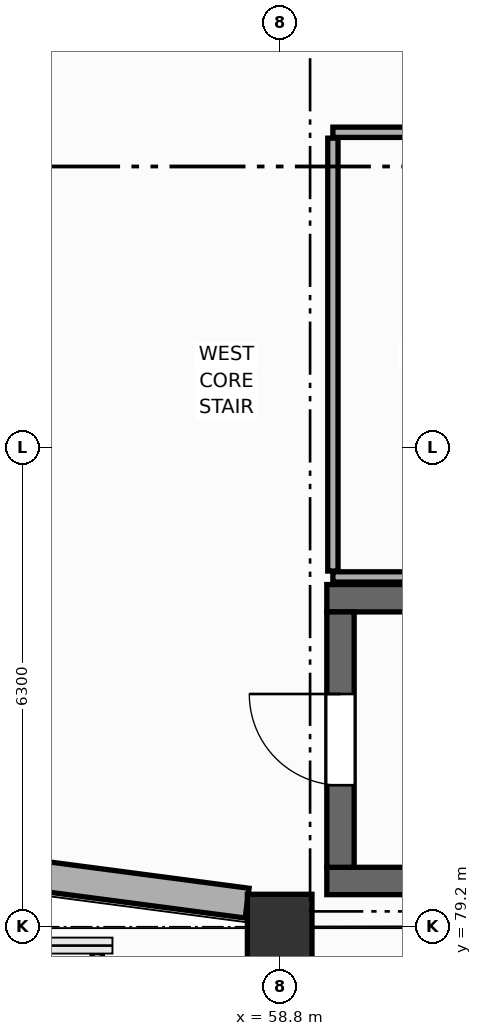
"""IFC4 building model, lengths in metres.
Left out: names, types, materials, properties, quantities, classifications, styles, units other than length and angle.
Written with IfcOpenShell. Run it as: python <this file> out.ifc"""

import sys

from ifc_helpers import new_model, si_unit, direction, frame, frame_2d, origin, origin_2d, place, context, subcontext, project, spatial, rectangle, extrude, element, fill, save


model = new_model("IFC4")
c1 = context("Model", 3, precision=1e-05, world=origin(), true_north=direction((0.0, 1.0)))
c2 = subcontext(c1, "Body", "Model", "MODEL_VIEW")
j1 = project(units=[si_unit("LENGTHUNIT", "METRE"), si_unit("PLANEANGLEUNIT", "RADIAN")], contexts=[c1])
p1 = place(None, origin())
s1 = spatial("IfcSite", under=j1, at=p1, CompositionType="ELEMENT")
p2 = place(p1, origin())
s2 = spatial("IfcBuilding", under=s1, at=p2, CompositionType="ELEMENT")
p3 = place(p2, frame((0.0, 0.0, 5.4)))
s3 = spatial("IfcBuildingStorey", under=s2, at=p3, CompositionType="ELEMENT", Elevation=5.4)
p4 = place(p3, frame((58.8, 79.2, 0.0), z_axis=(0.0, 0.0, 1.0), x_axis=(1.0, 0.0, 0.0)))
e1 = element("IfcColumn", 1, at=p4, inside=s3, PredefinedType="COLUMN", context=c2, shape_type="SweptSolid", body=[
    extrude(rectangle(XDim=0.85, YDim=0.85, at=origin_2d()), origin(), (0.0, 0.0, 1.0), 4.5),
])
p5 = place(p3, frame((55.572, 79.877, 0.0), z_axis=(0.0, 0.0, 1.0), x_axis=(0.991443994311, -0.130532778046, 0.0)))
e2 = element("IfcWall", 2, at=p5, inside=s3, PredefinedType="ELEMENTEDWALL", context=c2, shape_type="SweptSolid", body=[
    extrude(rectangle(XDim=2.824, YDim=0.395, at=frame_2d((1.412, 0.0))), origin(), (0.0, 0.0, 1.0), 3.37),
])
for number, where, z_axis, x_axis in (
    (3, (59.42, 83.52, 0.0), (0.0, 0.0, 1.0), (1.0, 0.0, 0.0)),
    (4, (68.78, 79.8, 0.0), (0.0, 0.0, 1.0), (-1.0, 0.0, 0.0)),
):
    element("IfcWall", number, at=place(p3, frame(where, z_axis=z_axis, x_axis=x_axis)), inside=s3, PredefinedType="SHEAR", context=c2, shape_type="SweptSolid", body=[
        extrude(rectangle(XDim=9.36, YDim=0.36, at=frame_2d((4.68, 0.0))), origin(), (0.0, 0.0, 1.0), 4.24),
    ])
p6 = place(p3, frame((59.6, 79.98, 0.0), z_axis=(0.0, 0.0, 1.0), x_axis=(0.0, 1.0, 0.0)))
e5 = element("IfcWall", 5, at=p6, inside=s3, PredefinedType="SHEAR", context=c2, shape_type="SweptSolid", body=[
    extrude(rectangle(XDim=3.36, YDim=0.36, at=frame_2d((1.68, 0.0))), origin(), (0.0, 0.0, 1.0), 4.24),
])
p7 = place(p6, frame((1.08, 0.0, 0.0)))
e6 = element("IfcOpeningElement", 6, at=p7, cuts=e5, PredefinedType="OPENING", context=c2, shape_type="SweptSolid", body=[
    extrude(rectangle(XDim=1.2, YDim=2.2, at=frame_2d((0.6, 1.1))), frame((0.0, 0.19, 0.0), z_axis=(0.0, -1.0, 0.0), x_axis=(1.0, 0.0, 0.0)), (0.0, 0.0, 1.0), 0.38),
])
p8 = place(p3, frame((59.5, 89.65, 0.0), z_axis=(0.0, 0.0, 1.0), x_axis=(1.0, 0.0, 0.0)))
e7 = element("IfcWall", 7, at=p8, inside=s3, PredefinedType="PARTITIONING", context=c2, shape_type="SweptSolid", body=[
    extrude(rectangle(XDim=3.5, YDim=0.135, at=frame_2d((1.75, 0.0))), origin(), (0.0, 0.0, 1.0), 4.225),
])
p9 = place(p8, frame((1.275, 0.0, 0.0)))
e8 = element("IfcOpeningElement", 8, at=p9, cuts=e7, PredefinedType="OPENING", context=c2, shape_type="SweptSolid", body=[
    extrude(rectangle(XDim=0.95, YDim=2.15, at=frame_2d((0.475, 1.075))), frame((0.0, 0.077, 0.0), z_axis=(0.0, -1.0, 0.0), x_axis=(1.0, 0.0, 0.0)), (0.0, 0.0, 1.0), 0.155),
])
p10 = place(p3, frame((63.0, 83.8, 0.0), z_axis=(0.0, 0.0, 1.0), x_axis=(-1.0, 0.0, 0.0)))
e9 = element("IfcWall", 9, at=p10, inside=s3, PredefinedType="PARTITIONING", context=c2, shape_type="SweptSolid", body=[
    extrude(rectangle(XDim=3.5, YDim=0.135, at=frame_2d((1.75, 0.0))), origin(), (0.0, 0.0, 1.0), 4.225),
])
p11 = place(p3, frame((59.5, 83.877, 0.0), z_axis=(0.0, 0.0, 1.0), x_axis=(0.0, 1.0, 0.0)))
e10 = element("IfcWall", 10, at=p11, inside=s3, PredefinedType="PARTITIONING", context=c2, shape_type="SweptSolid", body=[
    extrude(rectangle(XDim=5.695, YDim=0.135, at=frame_2d((2.848, 0.0))), origin(), (0.0, 0.0, 1.0), 4.225),
])
p12 = place(p3, frame((56.4, 78.86, 0.0), z_axis=(0.0, 0.0, 1.0), x_axis=(0.0, -1.0, 0.0)))
e11 = element("IfcWall", 11, at=p12, inside=s3, PredefinedType="PARTITIONING", context=c2, shape_type="SweptSolid", body=[
    extrude(rectangle(XDim=7.983, YDim=0.135, at=frame_2d((3.991, 0.0))), origin(), (0.0, 0.0, 1.0), 3.33),
])
p13 = place(p7, origin())
e12 = element("IfcDoor", 12, at=p13, inside=s3, OperationType="SINGLE_SWING_RIGHT", PredefinedType="DOOR", context=c2, shape_type="SweptSolid", body=[
    extrude(rectangle(XDim=1.2, YDim=2.2, at=frame_2d((0.6, 1.1))), frame((0.0, 0.025, 0.0), z_axis=(0.0, -1.0, 0.0), x_axis=(1.0, 0.0, 0.0)), (0.0, 0.0, 1.0), 0.05),
])
fill(e6, e12)
save(model, sys.argv[1])
